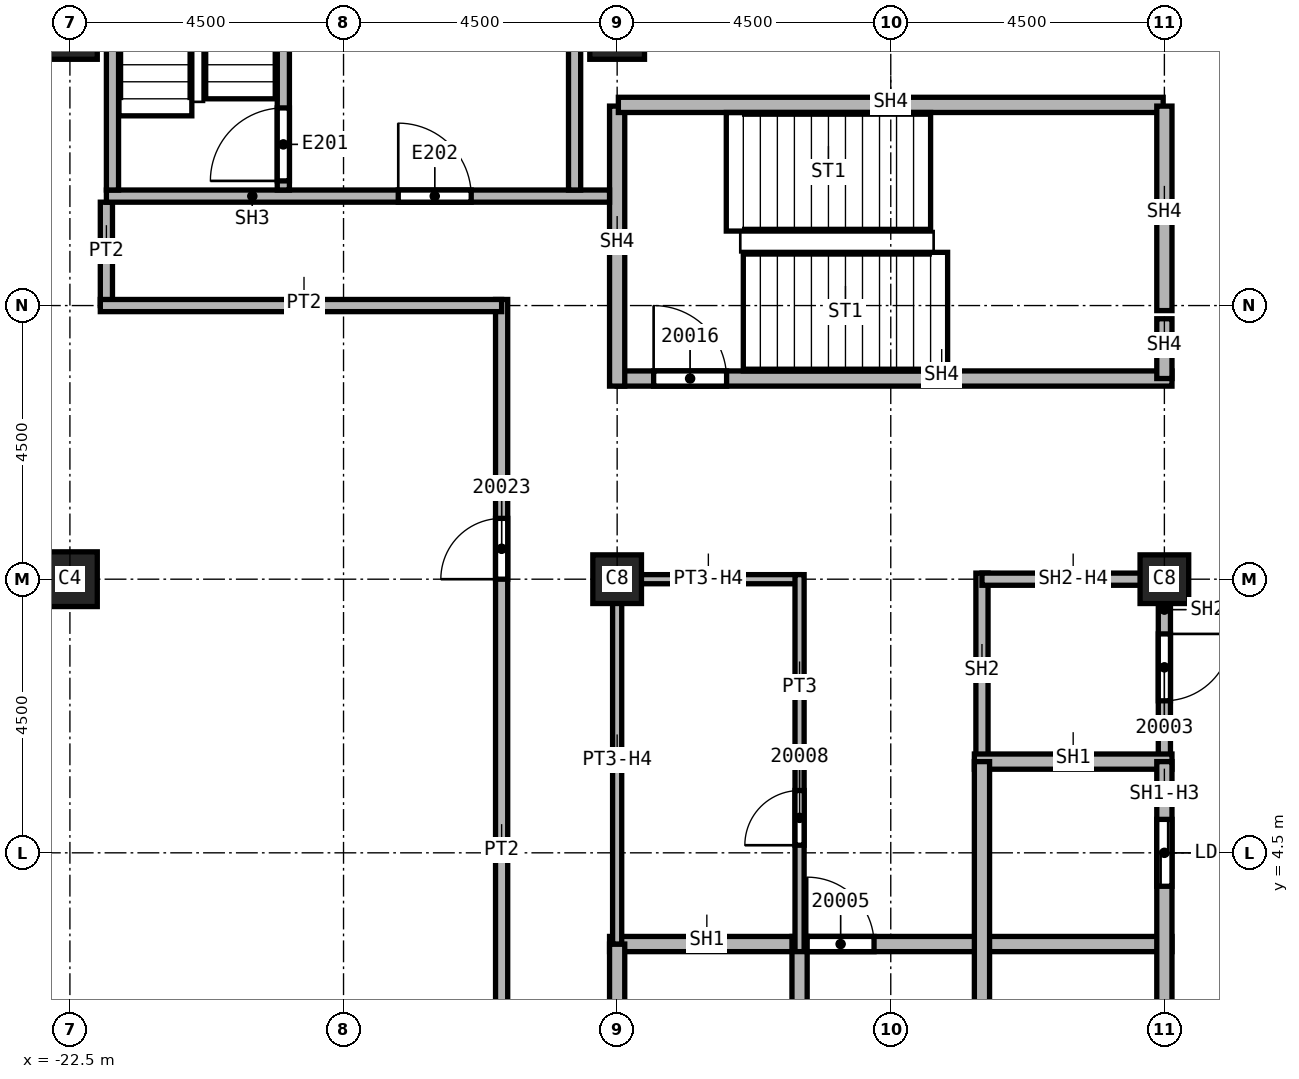
"""IFC4 building model, lengths in metres.
Left out: names, types, materials, properties, quantities, classifications, styles, units other than length and angle.
Written with IfcOpenShell. Run it as: python <this file> out.ifc"""

import sys

from ifc_helpers import new_model, si_unit, direction, frame, frame_2d, origin, origin_2d, place, context, subcontext, project, spatial, rectangle, extrude, element, fill, save


model = new_model("IFC4")
c1 = context("Model", 3, precision=1e-05, world=origin(), true_north=direction((0.0, 1.0)))
c2 = subcontext(c1, "Body", "Model", "MODEL_VIEW")
j1 = project(units=[si_unit("LENGTHUNIT", "METRE"), si_unit("PLANEANGLEUNIT", "RADIAN")], contexts=[c1])
p1 = place(None, origin())
s1 = spatial("IfcSite", under=j1, at=p1, CompositionType="ELEMENT")
p2 = place(p1, origin())
s2 = spatial("IfcBuilding", under=s1, at=p2, CompositionType="ELEMENT")
p3 = place(p2, frame((0.0, 0.0, 286.0)))
s3 = spatial("IfcBuildingStorey", under=s2, at=p3, CompositionType="ELEMENT", Elevation=286.0)
for number, where, z_axis, x_axis in (
    (1, (-13.5, 18.0, 0.0), (0.0, 0.0, 1.0), (1.0, 0.0, 0.0)),
    (2, (-22.5, 9.0, 0.0), (0.0, 0.0, 1.0), (1.0, 0.0, 0.0)),
    (3, (-22.5, 18.0, 0.0), (0.0, 0.0, 1.0), (1.0, 0.0, 0.0)),
):
    element("IfcColumn", number, at=place(p3, frame(where, z_axis=z_axis, x_axis=x_axis)), inside=s3, PredefinedType="COLUMN", context=c2, shape_type="SweptSolid", body=[
        extrude(rectangle(XDim=0.9, YDim=0.9, at=origin_2d()), origin(), (0.0, 0.0, 1.0), 3.72),
    ])
for number, where, z_axis, x_axis in (
    (4, (-4.5, 9.0, 0.0), (0.0, 0.0, 1.0), (1.0, 0.0, 0.0)),
    (5, (-13.5, 9.0, 0.0), (0.0, 0.0, 1.0), (1.0, 0.0, 0.0)),
):
    element("IfcColumn", number, at=place(p3, frame(where, z_axis=z_axis, x_axis=x_axis)), inside=s3, PredefinedType="COLUMN", context=c2, shape_type="SweptSolid", body=[
        extrude(rectangle(XDim=0.8, YDim=0.8, at=origin_2d()), origin(), (0.0, 0.0, 1.0), 3.72),
    ])
p4 = place(p3, frame((-21.9, 13.5, 0.0), z_axis=(0.0, 0.0, 1.0), x_axis=(0.0, 1.0, 0.0)))
e6 = element("IfcWall", 6, at=p4, inside=s3, PredefinedType="PARTITIONING", context=c2, shape_type="SweptSolid", body=[
    extrude(rectangle(XDim=1.7, YDim=0.2, at=frame_2d((0.85, 0.0))), origin(), (0.0, 0.0, 1.0), 3.72),
])
p5 = place(p3, frame((-15.4, -21.9, 0.0), z_axis=(0.0, 0.0, 1.0), x_axis=(0.0, 1.0, 0.0)))
e7 = element("IfcWall", 7, at=p5, inside=s3, PredefinedType="PARTITIONING", context=c2, shape_type="SweptSolid", body=[
    extrude(rectangle(XDim=35.5, YDim=0.2, at=frame_2d((17.75, 0.0))), origin(), (0.0, 0.0, 1.0), 3.72),
])
p6 = place(p5, frame((30.9, 0.0, 0.0)))
e8 = element("IfcOpeningElement", 8, at=p6, cuts=e7, PredefinedType="OPENING", context=c2, shape_type="SweptSolid", body=[
    extrude(rectangle(XDim=1.0, YDim=2.1, at=frame_2d((0.5, 1.05))), frame((0.0, 0.1, 0.0), z_axis=(0.0, -1.0, 0.0), x_axis=(1.0, 0.0, 0.0)), (0.0, 0.0, 1.0), 0.2),
])
p7 = place(p5, frame((2.65, 0.0, 0.0)))
e9 = element("IfcOpeningElement", 9, at=p7, cuts=e7, PredefinedType="OPENING", context=c2, shape_type="SweptSolid", body=[
    extrude(rectangle(XDim=1.0, YDim=2.1, at=frame_2d((0.5, 1.05))), frame((0.0, 0.1, 0.0), z_axis=(0.0, -1.0, 0.0), x_axis=(1.0, 0.0, 0.0)), (0.0, 0.0, 1.0), 0.2),
])
p8 = place(p5, frame((7.65, 0.0, 0.0)))
e10 = element("IfcOpeningElement", 10, at=p8, cuts=e7, PredefinedType="OPENING", context=c2, shape_type="SweptSolid", body=[
    extrude(rectangle(XDim=1.0, YDim=2.1, at=frame_2d((0.5, 1.05))), frame((0.0, 0.1, 0.0), z_axis=(0.0, -1.0, 0.0), x_axis=(1.0, 0.0, 0.0)), (0.0, 0.0, 1.0), 0.2),
])
p9 = place(p5, frame((14.7, 0.0, 0.0)))
e11 = element("IfcOpeningElement", 11, at=p9, cuts=e7, PredefinedType="OPENING", context=c2, shape_type="SweptSolid", body=[
    extrude(rectangle(XDim=1.0, YDim=2.1, at=frame_2d((0.5, 1.05))), frame((0.0, 0.1, 0.0), z_axis=(0.0, -1.0, 0.0), x_axis=(1.0, 0.0, 0.0)), (0.0, 0.0, 1.0), 0.2),
])
p10 = place(p5, frame((18.3, 0.0, 0.0)))
e12 = element("IfcOpeningElement", 12, at=p10, cuts=e7, PredefinedType="OPENING", context=c2, shape_type="SweptSolid", body=[
    extrude(rectangle(XDim=1.0, YDim=2.1, at=frame_2d((0.5, 1.05))), frame((0.0, 0.1, 0.0), z_axis=(0.0, -1.0, 0.0), x_axis=(1.0, 0.0, 0.0)), (0.0, 0.0, 1.0), 0.2),
])
p11 = place(p3, frame((-15.4, 13.5, 0.0), z_axis=(0.0, 0.0, 1.0), x_axis=(-1.0, 0.0, 0.0)))
e13 = element("IfcWall", 13, at=p11, inside=s3, PredefinedType="PARTITIONING", context=c2, shape_type="SweptSolid", body=[
    extrude(rectangle(XDim=6.6, YDim=0.2, at=frame_2d((3.3, 0.0))), origin(), (0.0, 0.0, 1.0), 3.72),
])
p12 = place(p3, frame((-7.5, 6.0, 0.0), z_axis=(0.0, 0.0, 1.0), x_axis=(0.0, 1.0, 0.0)))
e14 = element("IfcWall", 14, at=p12, inside=s3, PredefinedType="SOLIDWALL", context=c2, shape_type="SweptSolid", body=[
    extrude(rectangle(XDim=3.1, YDim=0.2, at=frame_2d((1.55, 0.0))), origin(), (0.0, 0.0, 1.0), 3.72),
])
p13 = place(p3, frame((-7.5, 9.0, 0.0), z_axis=(0.0, 0.0, 1.0), x_axis=(1.0, 0.0, 0.0)))
e15 = element("IfcWall", 15, at=p13, inside=s3, PredefinedType="SOLIDWALL", context=c2, shape_type="SweptSolid", body=[
    extrude(rectangle(XDim=3.0, YDim=0.2, at=frame_2d((1.5, 0.0))), origin(), (0.0, 0.0, 1.0), 3.042),
])
p14 = place(p3, frame((-4.5, 9.1, 0.0), z_axis=(0.0, 0.0, 1.0), x_axis=(0.0, -1.0, 0.0)))
e16 = element("IfcWall", 16, at=p14, inside=s3, PredefinedType="SOLIDWALL", context=c2, shape_type="SweptSolid", body=[
    extrude(rectangle(XDim=3.1, YDim=0.2, at=frame_2d((1.55, 0.0))), origin(), (0.0, 0.0, 1.0), 3.042),
])
p15 = place(p14, frame((1.0, 0.0, 0.0)))
e17 = element("IfcOpeningElement", 17, at=p15, cuts=e16, PredefinedType="OPENING", context=c2, shape_type="SweptSolid", body=[
    extrude(rectangle(XDim=1.1, YDim=2.1, at=frame_2d((0.55, 1.05))), frame((0.0, 0.1, 0.0), z_axis=(0.0, -1.0, 0.0), x_axis=(1.0, 0.0, 0.0)), (0.0, 0.0, 1.0), 0.2),
])
p16 = place(p3, frame((-13.625, 3.0, 0.0), z_axis=(0.0, 0.0, 1.0), x_axis=(1.0, 0.0, 0.0)))
e18 = element("IfcWall", 18, at=p16, inside=s3, PredefinedType="SOLIDWALL", context=c2, shape_type="SweptSolid", body=[
    extrude(rectangle(XDim=9.25, YDim=0.25, at=frame_2d((4.625, 0.0))), origin(), (0.0, 0.0, 1.0), 3.72),
])
p17 = place(p16, frame((3.25, 0.0, 0.0)))
e19 = element("IfcOpeningElement", 19, at=p17, cuts=e18, PredefinedType="OPENING", context=c2, shape_type="SweptSolid", body=[
    extrude(rectangle(XDim=1.1, YDim=2.1, at=frame_2d((0.55, 1.05))), frame((0.0, 0.125, 0.0), z_axis=(0.0, -1.0, 0.0), x_axis=(1.0, 0.0, 0.0)), (0.0, 0.0, 1.0), 0.25),
])
p18 = place(p3, frame((-13.5, -3.0, 0.0), z_axis=(0.0, 0.0, 1.0), x_axis=(0.0, 1.0, 0.0)))
e20 = element("IfcWall", 20, at=p18, inside=s3, PredefinedType="SOLIDWALL", context=c2, shape_type="SweptSolid", body=[
    extrude(rectangle(XDim=6.0, YDim=0.25, at=frame_2d((3.0, 0.0))), origin(), (0.0, 0.0, 1.0), 3.042),
])
p19 = place(p3, frame((-10.5, -3.125, 0.0), z_axis=(0.0, 0.0, 1.0), x_axis=(0.0, 1.0, 0.0)))
e21 = element("IfcWall", 21, at=p19, inside=s3, PredefinedType="SOLIDWALL", context=c2, shape_type="SweptSolid", body=[
    extrude(rectangle(XDim=6.25, YDim=0.25, at=frame_2d((3.125, 0.0))), origin(), (0.0, 0.0, 1.0), 3.72),
])
p20 = place(p19, frame((1.075, 0.0, 0.0)))
e22 = element("IfcOpeningElement", 22, at=p20, cuts=e21, PredefinedType="OPENING", context=c2, shape_type="SweptSolid", body=[
    extrude(rectangle(XDim=1.1, YDim=2.1, at=frame_2d((0.55, 1.05))), frame((0.0, 0.125, 0.0), z_axis=(0.0, -1.0, 0.0), x_axis=(1.0, 0.0, 0.0)), (0.0, 0.0, 1.0), 0.25),
])
p21 = place(p19, frame((4.075, 0.0, 0.0)))
e23 = element("IfcOpeningElement", 23, at=p21, cuts=e21, PredefinedType="OPENING", context=c2, shape_type="SweptSolid", body=[
    extrude(rectangle(XDim=1.1, YDim=2.1, at=frame_2d((0.55, 1.05))), frame((0.0, 0.125, 0.0), z_axis=(0.0, -1.0, 0.0), x_axis=(1.0, 0.0, 0.0)), (0.0, 0.0, 1.0), 0.25),
])
p22 = place(p3, frame((-7.625, 6.0, 0.0), z_axis=(0.0, 0.0, 1.0), x_axis=(1.0, 0.0, 0.0)))
e24 = element("IfcWall", 24, at=p22, inside=s3, PredefinedType="SOLIDWALL", context=c2, shape_type="SweptSolid", body=[
    extrude(rectangle(XDim=3.25, YDim=0.25, at=frame_2d((1.625, 0.0))), origin(), (0.0, 0.0, 1.0), 3.72),
])
p23 = place(p3, frame((-7.5, -3.125, 0.0), z_axis=(0.0, 0.0, 1.0), x_axis=(0.0, 1.0, 0.0)))
e25 = element("IfcWall", 25, at=p23, inside=s3, PredefinedType="SOLIDWALL", context=c2, shape_type="SweptSolid", body=[
    extrude(rectangle(XDim=9.125, YDim=0.25, at=frame_2d((4.562, 0.0))), origin(), (0.0, 0.0, 1.0), 3.72),
])
p24 = place(p3, frame((-4.5, 6.0, 0.0), z_axis=(0.0, 0.0, 1.0), x_axis=(0.0, -1.0, 0.0)))
e26 = element("IfcWall", 26, at=p24, inside=s3, PredefinedType="SOLIDWALL", context=c2, shape_type="SweptSolid", body=[
    extrude(rectangle(XDim=6.0, YDim=0.25, at=frame_2d((3.0, 0.0))), origin(), (0.0, 0.0, 1.0), 3.042),
])
p25 = place(p24, frame((3.95, 0.0, 0.0)))
e27 = element("IfcOpeningElement", 27, at=p25, cuts=e26, PredefinedType="OPENING", context=c2, shape_type="SweptSolid", body=[
    extrude(rectangle(XDim=1.1, YDim=2.1, at=frame_2d((0.55, 1.05))), frame((0.0, 0.125, 0.0), z_axis=(0.0, -1.0, 0.0), x_axis=(1.0, 0.0, 0.0)), (0.0, 0.0, 1.0), 0.25),
])
p26 = place(p24, frame((0.95, 0.0, 0.0)))
e28 = element("IfcOpeningElement", 28, at=p26, cuts=e26, PredefinedType="OPENING", context=c2, shape_type="SweptSolid", body=[
    extrude(rectangle(XDim=1.1, YDim=2.1, at=frame_2d((0.55, 1.05))), frame((0.0, 0.125, 0.0), z_axis=(0.0, -1.0, 0.0), x_axis=(1.0, 0.0, 0.0)), (0.0, 0.0, 1.0), 0.25),
])
p27 = place(p3, frame((-13.5, 12.3, 0.0), z_axis=(0.0, 0.0, 1.0), x_axis=(1.0, 0.0, 0.0)))
e29 = element("IfcWall", 29, at=p27, inside=s3, PredefinedType="SOLIDWALL", context=c2, shape_type="SweptSolid", body=[
    extrude(rectangle(XDim=9.125, YDim=0.25, at=frame_2d((4.562, 0.0))), origin(), (0.0, 0.0, 1.0), 3.72),
])
p28 = place(p27, frame((0.6, 0.0, 0.0)))
e30 = element("IfcOpeningElement", 30, at=p28, cuts=e29, PredefinedType="OPENING", context=c2, shape_type="SweptSolid", body=[
    extrude(rectangle(XDim=1.2, YDim=2.1, at=frame_2d((0.6, 1.05))), frame((0.0, 0.125, 0.0), z_axis=(0.0, -1.0, 0.0), x_axis=(1.0, 0.0, 0.0)), (0.0, 0.0, 1.0), 0.25),
])
p29 = place(p3, frame((-13.5, 16.78, 0.0), z_axis=(0.0, 0.0, 1.0), x_axis=(0.0, -1.0, 0.0)))
e31 = element("IfcWall", 31, at=p29, inside=s3, PredefinedType="SOLIDWALL", context=c2, shape_type="SweptSolid", body=[
    extrude(rectangle(XDim=4.605, YDim=0.25, at=frame_2d((2.302, 0.0))), origin(), (0.0, 0.0, 1.0), 3.72),
])
p30 = place(p3, frame((-13.48, 16.8, 0.0), z_axis=(0.0, 0.0, 1.0), x_axis=(1.0, 0.0, 0.0)))
e32 = element("IfcWall", 32, at=p30, inside=s3, PredefinedType="SOLIDWALL", context=c2, shape_type="SweptSolid", body=[
    extrude(rectangle(XDim=8.96, YDim=0.25, at=frame_2d((4.48, 0.0))), origin(), (0.0, 0.0, 1.0), 3.72),
])
p31 = place(p3, frame((-4.5, 13.283, 0.0), z_axis=(0.0, 0.0, 1.0), x_axis=(0.0, -1.0, 0.0)))
e33 = element("IfcWall", 33, at=p31, inside=s3, PredefinedType="SOLIDWALL", context=c2, shape_type="SweptSolid", body=[
    extrude(rectangle(XDim=0.983, YDim=0.25, at=frame_2d((0.491, 0.0))), origin(), (0.0, 0.0, 1.0), 3.72),
])
p32 = place(p3, frame((-4.5, 16.78, 0.0), z_axis=(0.0, 0.0, 1.0), x_axis=(0.0, -1.0, 0.0)))
e34 = element("IfcWall", 34, at=p32, inside=s3, PredefinedType="SOLIDWALL", context=c2, shape_type="SweptSolid", body=[
    extrude(rectangle(XDim=3.363, YDim=0.25, at=frame_2d((1.682, 0.0))), origin(), (0.0, 0.0, 1.0), 3.72),
])
p33 = place(p3, frame((-13.5, 3.0, 0.0), z_axis=(0.0, 0.0, 1.0), x_axis=(0.0, 1.0, 0.0)))
e35 = element("IfcWall", 35, at=p33, inside=s3, PredefinedType="PARTITIONING", context=c2, shape_type="SweptSolid", body=[
    extrude(rectangle(XDim=6.075, YDim=0.15, at=frame_2d((3.038, 0.0))), origin(), (0.0, 0.0, 1.0), 3.042),
])
p34 = place(p3, frame((-13.5, 9.0, 0.0), z_axis=(0.0, 0.0, 1.0), x_axis=(1.0, 0.0, 0.0)))
e36 = element("IfcWall", 36, at=p34, inside=s3, PredefinedType="PARTITIONING", context=c2, shape_type="SweptSolid", body=[
    extrude(rectangle(XDim=3.0, YDim=0.15, at=frame_2d((1.5, 0.0))), origin(), (0.0, 0.0, 1.0), 3.042),
])
p35 = place(p3, frame((-10.5, 2.875, 0.0), z_axis=(0.0, 0.0, 1.0), x_axis=(0.0, 1.0, 0.0)))
e37 = element("IfcWall", 37, at=p35, inside=s3, PredefinedType="PARTITIONING", context=c2, shape_type="SweptSolid", body=[
    extrude(rectangle(XDim=6.2, YDim=0.15, at=frame_2d((3.1, 0.0))), origin(), (0.0, 0.0, 1.0), 3.72),
])
p36 = place(p35, frame((1.75, 0.0, 0.0)))
e38 = element("IfcOpeningElement", 38, at=p36, cuts=e37, PredefinedType="OPENING", context=c2, shape_type="SweptSolid", body=[
    extrude(rectangle(XDim=0.9, YDim=2.1, at=frame_2d((0.45, 1.05))), frame((0.0, 0.075, 0.0), z_axis=(0.0, -1.0, 0.0), x_axis=(1.0, 0.0, 0.0)), (0.0, 0.0, 1.0), 0.15),
])
p37 = place(p3, frame((-21.9, 15.3, 0.0), z_axis=(0.0, 0.0, 1.0), x_axis=(1.0, 0.0, 0.0)))
e39 = element("IfcWall", 39, at=p37, inside=s3, PredefinedType="SOLIDWALL", context=c2, shape_type="SweptSolid", body=[
    extrude(rectangle(XDim=8.275, YDim=0.2, at=frame_2d((4.137, 0.0))), origin(), (0.0, 0.0, 1.0), 3.72),
])
p38 = place(p37, frame((4.8, 0.0, 0.0)))
e40 = element("IfcOpeningElement", 40, at=p38, cuts=e39, PredefinedType="OPENING", context=c2, shape_type="SweptSolid", body=[
    extrude(rectangle(XDim=1.2, YDim=2.1, at=frame_2d((0.6, 1.05))), frame((0.0, 0.1, 0.0), z_axis=(0.0, -1.0, 0.0), x_axis=(1.0, 0.0, 0.0)), (0.0, 0.0, 1.0), 0.2),
])
for number, where, z_axis, x_axis in (
    (41, (-21.8, 15.4, 0.0), (0.0, 0.0, 1.0), (0.0, 1.0, 0.0)),
    (42, (-14.2, 15.4, 0.0), (0.0, 0.0, 1.0), (0.0, 1.0, 0.0)),
):
    element("IfcWall", number, at=place(p3, frame(where, z_axis=z_axis, x_axis=x_axis)), inside=s3, PredefinedType="SOLIDWALL", context=c2, shape_type="SweptSolid", body=[
        extrude(rectangle(XDim=5.9, YDim=0.2, at=frame_2d((2.95, 0.0))), origin(), (0.0, 0.0, 1.0), 3.72),
    ])
p39 = place(p3, frame((-18.99, 15.4, 0.0), z_axis=(0.0, 0.0, 1.0), x_axis=(0.0, 1.0, 0.0)))
e43 = element("IfcWall", 43, at=p39, inside=s3, PredefinedType="SOLIDWALL", context=c2, shape_type="SweptSolid", body=[
    extrude(rectangle(XDim=5.9, YDim=0.2, at=frame_2d((2.95, 0.0))), origin(), (0.0, 0.0, 1.0), 3.72),
])
p40 = place(p39, frame((0.15, 0.0, 0.0)))
e44 = element("IfcOpeningElement", 44, at=p40, cuts=e43, PredefinedType="OPENING", context=c2, shape_type="SweptSolid", body=[
    extrude(rectangle(XDim=1.2, YDim=2.1, at=frame_2d((0.6, 1.05))), frame((0.0, 0.1, 0.0), z_axis=(0.0, -1.0, 0.0), x_axis=(1.0, 0.0, 0.0)), (0.0, 0.0, 1.0), 0.2),
])
p41 = place(p15, origin())
e45 = element("IfcDoor", 45, at=p41, inside=s3, OperationType="SINGLE_SWING_RIGHT", PredefinedType="DOOR", context=c2, shape_type="SweptSolid", body=[
    extrude(rectangle(XDim=1.1, YDim=2.1, at=frame_2d((0.55, 1.05))), frame((0.0, 0.025, 0.0), z_axis=(0.0, -1.0, 0.0), x_axis=(1.0, 0.0, 0.0)), (0.0, 0.0, 1.0), 0.05),
])
fill(e17, e45)
p42 = place(p17, origin())
e46 = element("IfcDoor", 46, at=p42, inside=s3, OperationType="SINGLE_SWING_RIGHT", PredefinedType="DOOR", context=c2, shape_type="SweptSolid", body=[
    extrude(rectangle(XDim=1.1, YDim=2.1, at=frame_2d((0.55, 1.05))), frame((0.0, 0.025, 0.0), z_axis=(0.0, -1.0, 0.0), x_axis=(1.0, 0.0, 0.0)), (0.0, 0.0, 1.0), 0.05),
])
fill(e19, e46)
p43 = place(p36, origin())
e47 = element("IfcDoor", 47, at=p43, inside=s3, OperationType="SINGLE_SWING_LEFT", PredefinedType="DOOR", context=c2, shape_type="SweptSolid", body=[
    extrude(rectangle(XDim=0.9, YDim=2.1, at=frame_2d((0.45, 1.05))), frame((0.0, 0.025, 0.0), z_axis=(0.0, -1.0, 0.0), x_axis=(1.0, 0.0, 0.0)), (0.0, 0.0, 1.0), 0.05),
])
fill(e38, e47)
p44 = place(p28, origin())
e48 = element("IfcDoor", 48, at=p44, inside=s3, OperationType="SINGLE_SWING_LEFT", PredefinedType="DOOR", context=c2, shape_type="SweptSolid", body=[
    extrude(rectangle(XDim=1.2, YDim=2.1, at=frame_2d((0.6, 1.05))), frame((0.0, 0.025, 0.0), z_axis=(0.0, -1.0, 0.0), x_axis=(1.0, 0.0, 0.0)), (0.0, 0.0, 1.0), 0.05),
])
fill(e30, e48)
p45 = place(p6, origin())
e49 = element("IfcDoor", 49, at=p45, inside=s3, OperationType="SINGLE_SWING_RIGHT", PredefinedType="DOOR", context=c2, shape_type="SweptSolid", body=[
    extrude(rectangle(XDim=1.0, YDim=2.1, at=frame_2d((0.5, 1.05))), frame((0.0, 0.025, 0.0), z_axis=(0.0, -1.0, 0.0), x_axis=(1.0, 0.0, 0.0)), (0.0, 0.0, 1.0), 0.05),
])
fill(e8, e49)
p46 = place(p26, origin())
e50 = element("IfcDoor", 50, at=p46, inside=s3, OperationType="SLIDING_TO_LEFT", PredefinedType="DOOR", context=c2, shape_type="SweptSolid", body=[
    extrude(rectangle(XDim=1.1, YDim=2.1, at=frame_2d((0.55, 1.05))), frame((0.0, 0.025, 0.0), z_axis=(0.0, -1.0, 0.0), x_axis=(1.0, 0.0, 0.0)), (0.0, 0.0, 1.0), 0.05),
])
fill(e28, e50)
p47 = place(p40, origin())
e51 = element("IfcDoor", 51, at=p47, inside=s3, OperationType="SINGLE_SWING_LEFT", PredefinedType="DOOR", context=c2, shape_type="SweptSolid", body=[
    extrude(rectangle(XDim=1.2, YDim=2.1, at=frame_2d((0.6, 1.05))), frame((0.0, 0.025, 0.0), z_axis=(0.0, -1.0, 0.0), x_axis=(1.0, 0.0, 0.0)), (0.0, 0.0, 1.0), 0.05),
])
fill(e44, e51)
p48 = place(p38, origin())
e52 = element("IfcDoor", 52, at=p48, inside=s3, OperationType="SINGLE_SWING_RIGHT", PredefinedType="DOOR", context=c2, shape_type="SweptSolid", body=[
    extrude(rectangle(XDim=1.2, YDim=2.1, at=frame_2d((0.6, 1.05))), frame((0.0, 0.025, 0.0), z_axis=(0.0, -1.0, 0.0), x_axis=(1.0, 0.0, 0.0)), (0.0, 0.0, 1.0), 0.05),
])
fill(e40, e52)
save(model, sys.argv[1])
